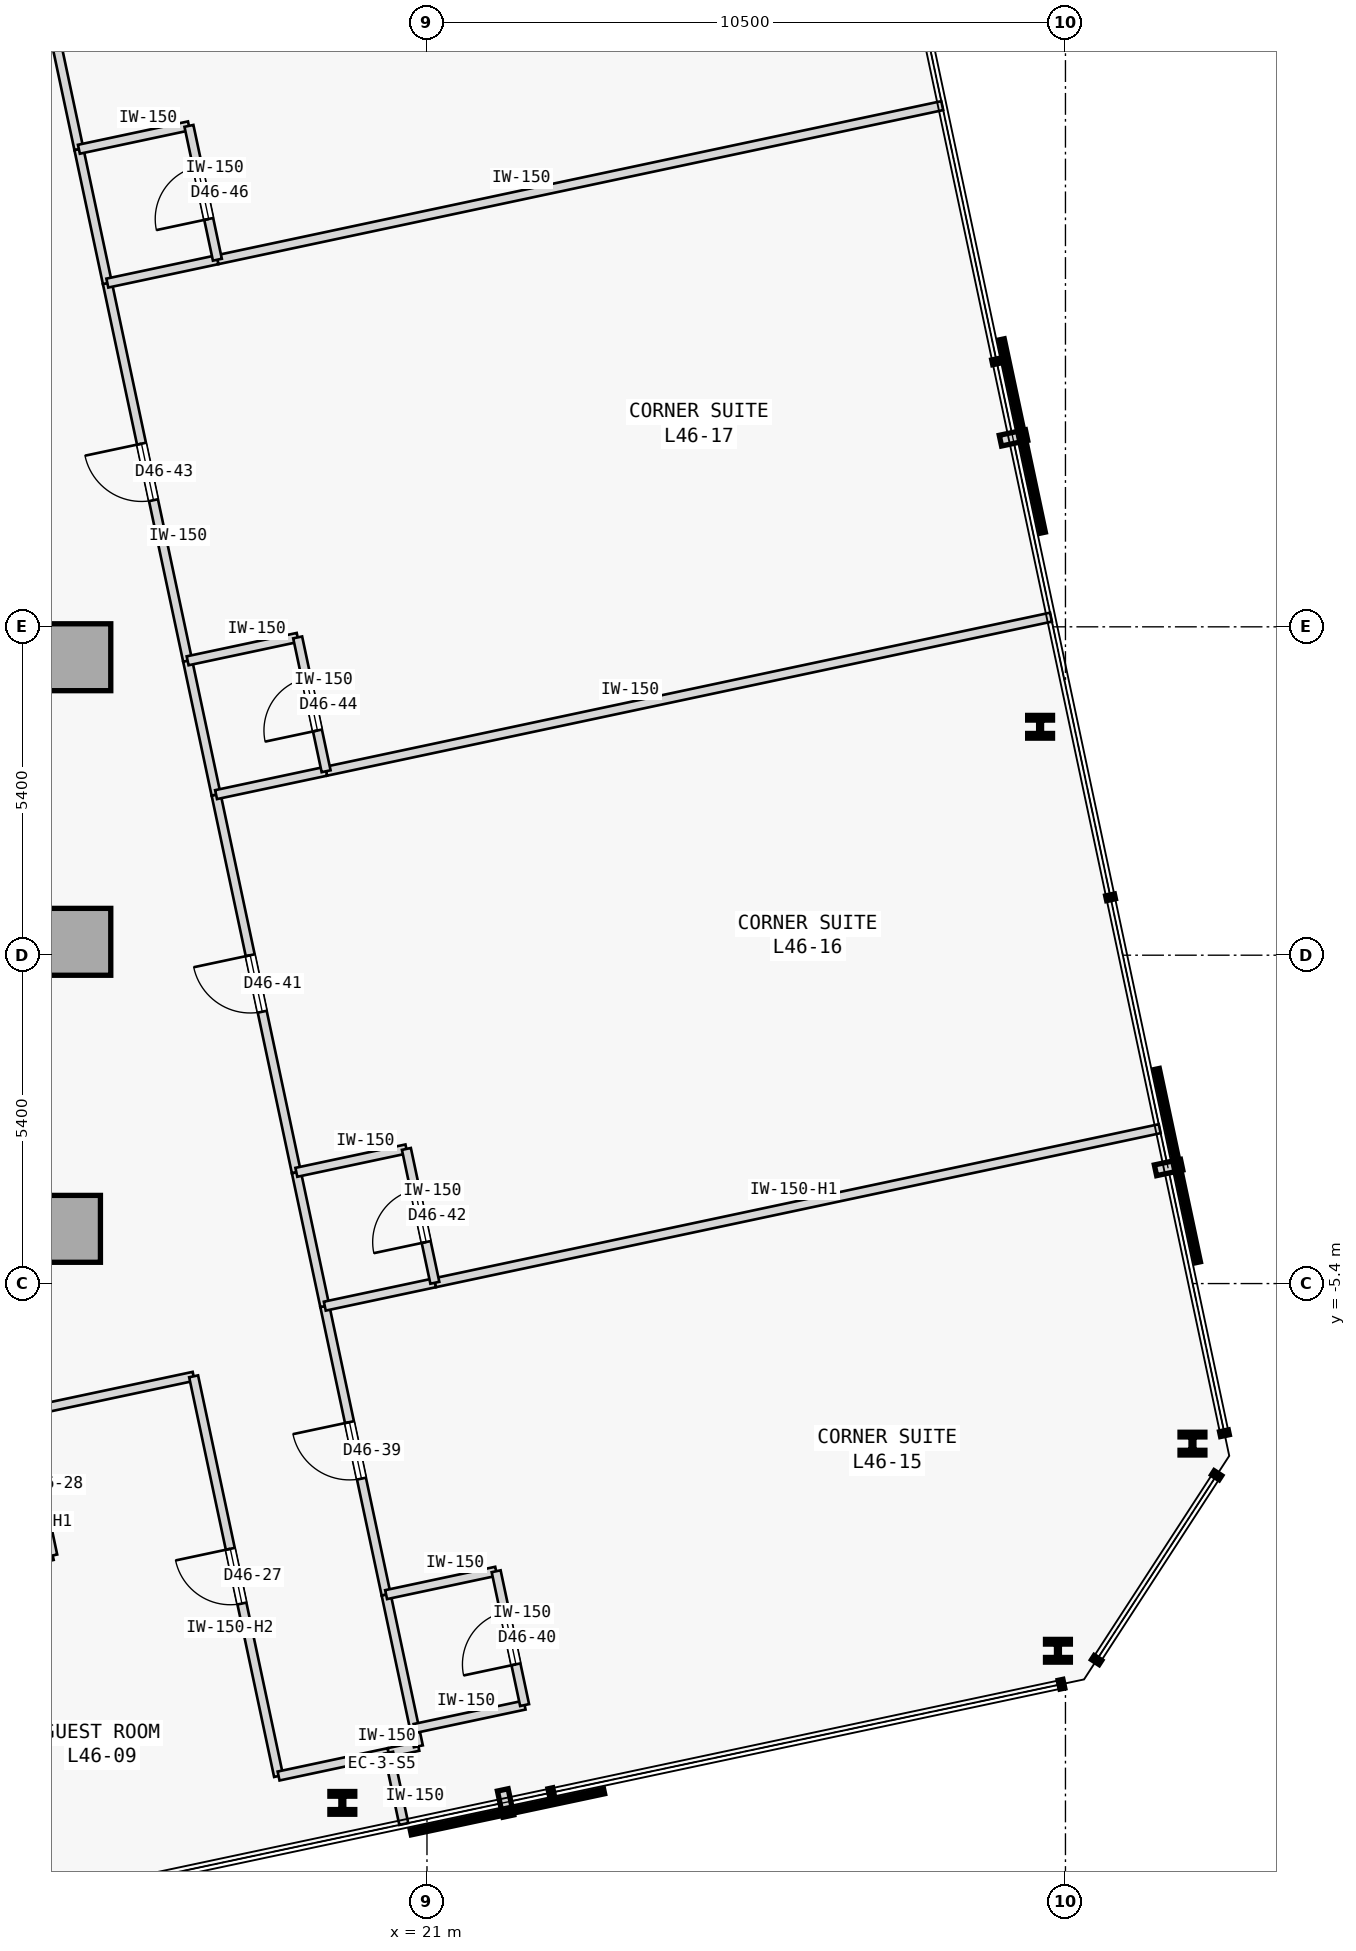
"""IFC4 building model, lengths in metres.
Left out: names, types, materials, properties, quantities, classifications, styles, units other than length and angle.
Written with IfcOpenShell. Run it as: python <this file> out.ifc"""

import sys

from ifc_helpers import new_model, si_unit, direction, frame, frame_2d, origin, origin_2d, place, context, subcontext, project, spatial, rectangle, i_section, extrude, element, fill, save


model = new_model("IFC4")
c1 = context("Model", 3, precision=1e-05, world=origin(), true_north=direction((0.0, 1.0)))
c2 = subcontext(c1, "Body", "Model", "MODEL_VIEW")
j1 = project(units=[si_unit("LENGTHUNIT", "METRE"), si_unit("PLANEANGLEUNIT", "RADIAN")], contexts=[c1])
p1 = place(None, origin())
s1 = spatial("IfcSite", under=j1, at=p1, CompositionType="ELEMENT")
p2 = place(p1, origin())
s2 = spatial("IfcBuilding", under=s1, at=p2, CompositionType="ELEMENT")
p3 = place(p2, frame((0.0, 0.0, 178.6)))
s3 = spatial("IfcBuildingStorey", under=s2, at=p3, CompositionType="ELEMENT", Elevation=178.6)
for number, where, z_axis, x_axis in (
    (1, (15.25, 4.9, 0.0), (0.0, 0.0, 1.0), (1.0, 0.0, 0.0)),
    (2, (15.25, 0.22, 0.0), (0.0, 0.0, 1.0), (1.0, 0.0, 0.0)),
    (3, (15.08, -4.5, 0.0), (0.0, 0.0, 1.0), (1.0, 0.0, 0.0)),
):
    element("IfcColumn", number, at=place(p3, frame(where, z_axis=z_axis, x_axis=x_axis)), inside=s3, PredefinedType="COLUMN", context=c2, shape_type="SweptSolid", body=[
        extrude(rectangle(XDim=1.1, YDim=1.1, at=origin_2d()), origin(), (0.0, 0.0, 1.0), 3.4),
    ])
for number, where, z_axis, x_axis in (
    (4, (19.608, -13.94, 0.0), (0.0, 0.0, 1.0), (1.0, 0.0, 0.0)),
    (5, (31.376, -11.439, 0.0), (0.0, 0.0, 1.0), (1.0, 0.0, 0.0)),
    (6, (33.589, -8.032, 0.0), (0.0, 0.0, 1.0), (1.0, 0.0, 0.0)),
    (7, (31.083, 3.756, 0.0), (0.0, 0.0, 1.0), (1.0, 0.0, 0.0)),
):
    element("IfcColumn", number, at=place(p3, frame(where, z_axis=z_axis, x_axis=x_axis)), inside=s3, PredefinedType="COLUMN", context=c2, shape_type="SweptSolid", body=[
        extrude(i_section(OverallWidth=0.409, OverallDepth=0.374, WebThickness=0.048, FlangeThickness=0.077, FilletRadius=0.015, at=origin_2d()), origin(), (0.0, 0.0, 1.0), 3.4),
    ])
p4 = place(p3, frame((14.346, -7.524, 0.0), z_axis=(0.0, 0.0, 1.0), x_axis=(0.97816208355, 0.207843542851, 0.0)))
e8 = element("IfcWall", 8, at=p4, inside=s3, PredefinedType="PARTITIONING", context=c2, shape_type="SweptSolid", body=[
    extrude(rectangle(XDim=2.879, YDim=0.15, at=frame_2d((1.439, 0.0))), origin(), (0.0, 0.0, 1.0), 3.175),
])
p5 = place(p3, frame((18.56, -13.498, 0.0), z_axis=(0.0, 0.0, 1.0), x_axis=(-0.207888737749, 0.978152479278, 0.0)))
e9 = element("IfcWall", 9, at=p5, inside=s3, PredefinedType="PARTITIONING", context=c2, shape_type="SweptSolid", body=[
    extrude(rectangle(XDim=6.72, YDim=0.15, at=frame_2d((3.36, 0.0))), origin(), (0.0, 0.0, 1.0), 2.575),
])
p6 = place(p5, frame((2.9, 0.0, 0.0)))
e10 = element("IfcOpeningElement", 10, at=p6, cuts=e9, PredefinedType="OPENING", context=c2, shape_type="SweptSolid", body=[
    extrude(rectangle(XDim=0.92, YDim=2.15, at=frame_2d((0.46, 1.075))), frame((0.0, 0.085, 0.0), z_axis=(0.0, -1.0, 0.0), x_axis=(1.0, 0.0, 0.0)), (0.0, 0.0, 1.0), 0.17),
])
p7 = place(p3, frame((18.56, -13.498, 0.0), z_axis=(0.0, 0.0, 1.0), x_axis=(0.978160192495, 0.207852442415, 0.0)))
e11 = element("IfcWall", 11, at=p7, inside=s3, PredefinedType="PARTITIONING", context=c2, shape_type="SweptSolid", body=[
    extrude(rectangle(XDim=1.85, YDim=0.15, at=frame_2d((0.925, 0.0))), origin(), (0.0, 0.0, 1.0), 3.175),
])
p8 = place(p3, frame((20.369, -13.114, 0.0), z_axis=(0.0, 0.0, 1.0), x_axis=(0.978143962546, 0.207928806409, 0.0)))
e12 = element("IfcWall", 12, at=p8, inside=s3, PredefinedType="PARTITIONING", context=c2, shape_type="SweptSolid", body=[
    extrude(rectangle(XDim=0.5, YDim=0.15, at=frame_2d((0.25, 0.0))), origin(), (0.0, 0.0, 1.0), 3.175),
])
p9 = place(p3, frame((20.858, -13.01, 0.0), z_axis=(0.0, 0.0, 1.0), x_axis=(-0.208306395052, 0.978063620518, 0.0)))
e13 = element("IfcWall", 13, at=p9, inside=s3, PredefinedType="PARTITIONING", context=c2, shape_type="SweptSolid", body=[
    extrude(rectangle(XDim=0.3, YDim=0.15, at=frame_2d((0.15, 0.0))), origin(), (0.0, 0.0, 1.0), 3.175),
])
p10 = place(p3, frame((20.328, -10.515, 0.0), z_axis=(0.0, 0.0, 1.0), x_axis=(-0.207950868925, 0.97813927235, 0.0)))
e14 = element("IfcWall", 14, at=p10, inside=s3, PredefinedType="PARTITIONING", context=c2, shape_type="SweptSolid", body=[
    extrude(rectangle(XDim=4.85, YDim=0.15, at=frame_2d((2.425, 0.0))), origin(), (0.0, 0.0, 1.0), 3.175),
])
p11 = place(p10, frame((1.95, 0.0, 0.0)))
e15 = element("IfcOpeningElement", 15, at=p11, cuts=e14, PredefinedType="OPENING", context=c2, shape_type="SweptSolid", body=[
    extrude(rectangle(XDim=0.95, YDim=2.15, at=frame_2d((0.475, 1.075))), frame((0.0, 0.085, 0.0), z_axis=(0.0, -1.0, 0.0), x_axis=(1.0, 0.0, 0.0)), (0.0, 0.0, 1.0), 0.17),
])
p12 = place(p3, frame((20.796, -12.716, 0.0), z_axis=(0.0, 0.0, 1.0), x_axis=(-0.207891197838, 0.978151956427, 0.0)))
e16 = element("IfcWall", 16, at=p12, inside=s3, PredefinedType="PARTITIONING", context=c2, shape_type="SweptSolid", body=[
    extrude(rectangle(XDim=2.25, YDim=0.15, at=frame_2d((1.125, 0.0))), origin(), (0.0, 0.0, 1.0), 3.175),
])
p13 = place(p3, frame((18.852, -3.571, 0.0), z_axis=(0.0, 0.0, 1.0), x_axis=(-0.207879907349, 0.978154355979, 0.0)))
e17 = element("IfcWall", 17, at=p13, inside=s3, PredefinedType="PARTITIONING", context=c2, shape_type="SweptSolid", body=[
    extrude(rectangle(XDim=6.35, YDim=0.15, at=frame_2d((3.175, 0.0))), origin(), (0.0, 0.0, 1.0), 3.175),
])
p14 = place(p13, frame((2.7, 0.0, 0.0)))
e18 = element("IfcOpeningElement", 18, at=p14, cuts=e17, PredefinedType="OPENING", context=c2, shape_type="SweptSolid", body=[
    extrude(rectangle(XDim=0.95, YDim=2.15, at=frame_2d((0.475, 1.075))), frame((0.0, 0.085, 0.0), z_axis=(0.0, -1.0, 0.0), x_axis=(1.0, 0.0, 0.0)), (0.0, 0.0, 1.0), 0.17),
])
p15 = place(p3, frame((19.32, -5.771, 0.0), z_axis=(0.0, 0.0, 1.0), x_axis=(-0.207913264065, 0.978147266328, 0.0)))
e19 = element("IfcWall", 19, at=p15, inside=s3, PredefinedType="PARTITIONING", context=c2, shape_type="SweptSolid", body=[
    extrude(rectangle(XDim=2.25, YDim=0.15, at=frame_2d((1.125, 0.0))), origin(), (0.0, 0.0, 1.0), 3.175),
])
p16 = place(p3, frame((17.064, 4.841, 0.0), z_axis=(0.0, 0.0, 1.0), x_axis=(-0.207924511115, 0.978144875608, 0.0)))
e20 = element("IfcWall", 20, at=p16, inside=s3, PredefinedType="PARTITIONING", context=c2, shape_type="SweptSolid", body=[
    extrude(rectangle(XDim=6.35, YDim=0.15, at=frame_2d((3.175, 0.0))), origin(), (0.0, 0.0, 1.0), 3.175),
])
p17 = place(p16, frame((2.7, 0.0, 0.0)))
e21 = element("IfcOpeningElement", 21, at=p17, cuts=e20, PredefinedType="OPENING", context=c2, shape_type="SweptSolid", body=[
    extrude(rectangle(XDim=0.95, YDim=2.15, at=frame_2d((0.475, 1.075))), frame((0.0, 0.085, 0.0), z_axis=(0.0, -1.0, 0.0), x_axis=(1.0, 0.0, 0.0)), (0.0, 0.0, 1.0), 0.17),
])
p18 = place(p3, frame((17.532, 2.641, 0.0), z_axis=(0.0, 0.0, 1.0), x_axis=(-0.207913264065, 0.978147266328, 0.0)))
e22 = element("IfcWall", 22, at=p18, inside=s3, PredefinedType="PARTITIONING", context=c2, shape_type="SweptSolid", body=[
    extrude(rectangle(XDim=2.25, YDim=0.15, at=frame_2d((1.125, 0.0))), origin(), (0.0, 0.0, 1.0), 3.175),
])
p19 = place(p3, frame((15.276, 13.253, 0.0), z_axis=(0.0, 0.0, 1.0), x_axis=(-0.207924511115, 0.978144875608, 0.0)))
e23 = element("IfcWall", 23, at=p19, inside=s3, PredefinedType="PARTITIONING", context=c2, shape_type="SweptSolid", body=[
    extrude(rectangle(XDim=6.35, YDim=0.15, at=frame_2d((3.175, 0.0))), origin(), (0.0, 0.0, 1.0), 3.175),
])
p20 = place(p19, frame((2.7, 0.0, 0.0)))
e24 = element("IfcOpeningElement", 24, at=p20, cuts=e23, PredefinedType="OPENING", context=c2, shape_type="SweptSolid", body=[
    extrude(rectangle(XDim=0.95, YDim=2.15, at=frame_2d((0.475, 1.075))), frame((0.0, 0.085, 0.0), z_axis=(0.0, -1.0, 0.0), x_axis=(1.0, 0.0, 0.0)), (0.0, 0.0, 1.0), 0.17),
])
p21 = place(p3, frame((15.744, 11.052, 0.0), z_axis=(0.0, 0.0, 1.0), x_axis=(-0.207891197838, 0.978151956427, 0.0)))
e25 = element("IfcWall", 25, at=p21, inside=s3, PredefinedType="PARTITIONING", context=c2, shape_type="SweptSolid", body=[
    extrude(rectangle(XDim=2.25, YDim=0.15, at=frame_2d((1.125, 0.0))), origin(), (0.0, 0.0, 1.0), 3.175),
])
p22 = place(p3, frame((12.742, -10.318, 0.0), z_axis=(0.0, 0.0, 1.0), x_axis=(0.978146728319, 0.207915795165, 0.0)))
e26 = element("IfcWall", 26, at=p22, inside=s3, PredefinedType="PARTITIONING", context=c2, shape_type="SweptSolid", body=[
    extrude(rectangle(XDim=2.15, YDim=0.15, at=frame_2d((1.075, 0.0))), origin(), (0.0, 0.0, 1.0), 3.175),
])
p23 = place(p3, frame((14.845, -9.871, 0.0), z_axis=(0.0, 0.0, 1.0), x_axis=(-0.207917150959, 0.978146440129, 0.0)))
e27 = element("IfcWall", 27, at=p23, inside=s3, PredefinedType="PARTITIONING", context=c2, shape_type="SweptSolid", body=[
    extrude(rectangle(XDim=2.4, YDim=0.15, at=frame_2d((1.2, 0.0))), origin(), (0.0, 0.0, 1.0), 2.725),
])
p24 = place(p23, frame((0.76, 0.0, 0.0)))
e28 = element("IfcOpeningElement", 28, at=p24, cuts=e27, PredefinedType="OPENING", context=c2, shape_type="SweptSolid", body=[
    extrude(rectangle(XDim=0.88, YDim=2.15, at=frame_2d((0.44, 1.075))), frame((0.0, 0.085, 0.0), z_axis=(0.0, -1.0, 0.0), x_axis=(1.0, 0.0, 0.0)), (0.0, 0.0, 1.0), 0.17),
])
p25 = place(p3, frame((20.619, -14.288, 0.0), z_axis=(0.0, 0.0, 1.0), x_axis=(-0.207917150959, 0.978146440129, 0.0)))
e29 = element("IfcWall", 29, at=p25, inside=s3, PredefinedType="PARTITIONING", context=c2, shape_type="SweptSolid", body=[
    extrude(rectangle(XDim=1.2, YDim=0.15, at=frame_2d((0.6, 0.0))), origin(), (0.0, 0.0, 1.0), 3.175),
])
for number, where, z_axis, x_axis in (
    (30, (20.796, -12.716, 0.0), (0.0, 0.0, 1.0), (0.978, 0.208, 0.0)),
    (31, (20.328, -10.515, 0.0), (0.0, 0.0, 1.0), (0.978, 0.208, 0.0)),
):
    element("IfcWall", number, at=place(p3, frame(where, z_axis=z_axis, x_axis=x_axis)), inside=s3, PredefinedType="PARTITIONING", context=c2, shape_type="SweptSolid", body=[
        extrude(rectangle(XDim=1.85, YDim=0.15, at=frame_2d((0.925, 0.0))), origin(), (0.0, 0.0, 1.0), 3.175),
    ])
p26 = place(p3, frame((22.605, -12.332, 0.0), z_axis=(0.0, 0.0, 1.0), x_axis=(-0.207891197838, 0.978151956427, 0.0)))
e32 = element("IfcWall", 32, at=p26, inside=s3, PredefinedType="PARTITIONING", context=c2, shape_type="SweptSolid", body=[
    extrude(rectangle(XDim=2.25, YDim=0.15, at=frame_2d((1.125, 0.0))), origin(), (0.0, 0.0, 1.0), 3.175),
])
p27 = place(p26, frame((0.685, 0.0, 0.0)))
e33 = element("IfcOpeningElement", 33, at=p27, cuts=e32, PredefinedType="OPENING", context=c2, shape_type="SweptSolid", body=[
    extrude(rectangle(XDim=0.88, YDim=2.15, at=frame_2d((0.44, 1.075))), frame((0.0, 0.085, 0.0), z_axis=(0.0, -1.0, 0.0), x_axis=(1.0, 0.0, 0.0)), (0.0, 0.0, 1.0), 0.17),
])
p28 = place(p3, frame((21.129, -5.387, 0.0), z_axis=(0.0, 0.0, 1.0), x_axis=(0.97814556055, 0.207921288896, 0.0)))
e34 = element("IfcWall", 34, at=p28, inside=s3, PredefinedType="PARTITIONING", context=c2, shape_type="SweptSolid", body=[
    extrude(rectangle(XDim=12.187, YDim=0.15, at=frame_2d((6.094, 0.0))), origin(), (0.0, 0.0, 1.0), 2.725),
])
p29 = place(p3, frame((19.32, -5.771, 0.0), z_axis=(0.0, 0.0, 1.0), x_axis=(0.978165892835, 0.207825614625, 0.0)))
e35 = element("IfcWall", 35, at=p29, inside=s3, PredefinedType="PARTITIONING", context=c2, shape_type="SweptSolid", body=[
    extrude(rectangle(XDim=1.85, YDim=0.15, at=frame_2d((0.925, 0.0))), origin(), (0.0, 0.0, 1.0), 3.175),
])
p30 = place(p3, frame((18.852, -3.571, 0.0), z_axis=(0.0, 0.0, 1.0), x_axis=(0.978139061018, 0.207951862966, 0.0)))
e36 = element("IfcWall", 36, at=p30, inside=s3, PredefinedType="PARTITIONING", context=c2, shape_type="SweptSolid", body=[
    extrude(rectangle(XDim=1.85, YDim=0.15, at=frame_2d((0.925, 0.0))), origin(), (0.0, 0.0, 1.0), 3.175),
])
p31 = place(p3, frame((21.129, -5.387, 0.0), z_axis=(0.0, 0.0, 1.0), x_axis=(-0.207891197838, 0.978151956427, 0.0)))
e37 = element("IfcWall", 37, at=p31, inside=s3, PredefinedType="PARTITIONING", context=c2, shape_type="SweptSolid", body=[
    extrude(rectangle(XDim=2.25, YDim=0.15, at=frame_2d((1.125, 0.0))), origin(), (0.0, 0.0, 1.0), 3.175),
])
p32 = place(p31, frame((0.685, 0.0, 0.0)))
e38 = element("IfcOpeningElement", 38, at=p32, cuts=e37, PredefinedType="OPENING", context=c2, shape_type="SweptSolid", body=[
    extrude(rectangle(XDim=0.88, YDim=2.15, at=frame_2d((0.44, 1.075))), frame((0.0, 0.085, 0.0), z_axis=(0.0, -1.0, 0.0), x_axis=(1.0, 0.0, 0.0)), (0.0, 0.0, 1.0), 0.17),
])
p33 = place(p3, frame((19.341, 3.025, 0.0), z_axis=(0.0, 0.0, 1.0), x_axis=(0.97814556055, 0.207921288896, 0.0)))
e39 = element("IfcWall", 39, at=p33, inside=s3, PredefinedType="PARTITIONING", context=c2, shape_type="SweptSolid", body=[
    extrude(rectangle(XDim=12.187, YDim=0.15, at=frame_2d((6.094, 0.0))), origin(), (0.0, 0.0, 1.0), 3.175),
])
p34 = place(p3, frame((17.532, 2.641, 0.0), z_axis=(0.0, 0.0, 1.0), x_axis=(0.978160192495, 0.207852442415, 0.0)))
e40 = element("IfcWall", 40, at=p34, inside=s3, PredefinedType="PARTITIONING", context=c2, shape_type="SweptSolid", body=[
    extrude(rectangle(XDim=1.85, YDim=0.15, at=frame_2d((0.925, 0.0))), origin(), (0.0, 0.0, 1.0), 3.175),
])
p35 = place(p3, frame((17.064, 4.841, 0.0), z_axis=(0.0, 0.0, 1.0), x_axis=(0.978133353907, 0.20797870558, 0.0)))
e41 = element("IfcWall", 41, at=p35, inside=s3, PredefinedType="PARTITIONING", context=c2, shape_type="SweptSolid", body=[
    extrude(rectangle(XDim=1.85, YDim=0.15, at=frame_2d((0.925, 0.0))), origin(), (0.0, 0.0, 1.0), 3.175),
])
p36 = place(p3, frame((19.341, 3.025, 0.0), z_axis=(0.0, 0.0, 1.0), x_axis=(-0.207891197838, 0.978151956427, 0.0)))
e42 = element("IfcWall", 42, at=p36, inside=s3, PredefinedType="PARTITIONING", context=c2, shape_type="SweptSolid", body=[
    extrude(rectangle(XDim=2.25, YDim=0.15, at=frame_2d((1.125, 0.0))), origin(), (0.0, 0.0, 1.0), 3.175),
])
p37 = place(p36, frame((0.685, 0.0, 0.0)))
e43 = element("IfcOpeningElement", 43, at=p37, cuts=e42, PredefinedType="OPENING", context=c2, shape_type="SweptSolid", body=[
    extrude(rectangle(XDim=0.88, YDim=2.15, at=frame_2d((0.44, 1.075))), frame((0.0, 0.085, 0.0), z_axis=(0.0, -1.0, 0.0), x_axis=(1.0, 0.0, 0.0)), (0.0, 0.0, 1.0), 0.17),
])
p38 = place(p3, frame((17.553, 11.437, 0.0), z_axis=(0.0, 0.0, 1.0), x_axis=(0.97814556055, 0.207921288896, 0.0)))
e44 = element("IfcWall", 44, at=p38, inside=s3, PredefinedType="PARTITIONING", context=c2, shape_type="SweptSolid", body=[
    extrude(rectangle(XDim=12.187, YDim=0.15, at=frame_2d((6.094, 0.0))), origin(), (0.0, 0.0, 1.0), 3.175),
])
for number, where, z_axis, x_axis in (
    (45, (15.744, 11.052, 0.0), (0.0, 0.0, 1.0), (0.978, 0.208, 0.0)),
    (46, (15.276, 13.253, 0.0), (0.0, 0.0, 1.0), (0.978, 0.208, 0.0)),
):
    element("IfcWall", number, at=place(p3, frame(where, z_axis=z_axis, x_axis=x_axis)), inside=s3, PredefinedType="PARTITIONING", context=c2, shape_type="SweptSolid", body=[
        extrude(rectangle(XDim=1.85, YDim=0.15, at=frame_2d((0.925, 0.0))), origin(), (0.0, 0.0, 1.0), 3.175),
    ])
p39 = place(p3, frame((17.553, 11.437, 0.0), z_axis=(0.0, 0.0, 1.0), x_axis=(-0.207891197838, 0.978151956427, 0.0)))
e47 = element("IfcWall", 47, at=p39, inside=s3, PredefinedType="PARTITIONING", context=c2, shape_type="SweptSolid", body=[
    extrude(rectangle(XDim=2.25, YDim=0.15, at=frame_2d((1.125, 0.0))), origin(), (0.0, 0.0, 1.0), 3.175),
])
p40 = place(p39, frame((0.685, 0.0, 0.0)))
e48 = element("IfcOpeningElement", 48, at=p40, cuts=e47, PredefinedType="OPENING", context=c2, shape_type="SweptSolid", body=[
    extrude(rectangle(XDim=0.88, YDim=2.15, at=frame_2d((0.44, 1.075))), frame((0.0, 0.085, 0.0), z_axis=(0.0, -1.0, 0.0), x_axis=(1.0, 0.0, 0.0)), (0.0, 0.0, 1.0), 0.17),
])
p41 = place(p6, origin())
e49 = element("IfcDoor", 49, at=p41, inside=s3, OperationType="SINGLE_SWING_RIGHT", PredefinedType="DOOR", context=c2, shape_type="SweptSolid", body=[
    extrude(rectangle(XDim=0.92, YDim=2.15, at=frame_2d((0.46, 1.075))), frame((0.0, 0.025, 0.0), z_axis=(0.0, -1.0, 0.0), x_axis=(1.0, 0.0, 0.0)), (0.0, 0.0, 1.0), 0.05),
])
fill(e10, e49)
p42 = place(p11, origin())
e50 = element("IfcDoor", 50, at=p42, inside=s3, OperationType="SINGLE_SWING_RIGHT", PredefinedType="DOOR", context=c2, shape_type="SweptSolid", body=[
    extrude(rectangle(XDim=0.95, YDim=2.15, at=frame_2d((0.475, 1.075))), frame((0.0, 0.025, 0.0), z_axis=(0.0, -1.0, 0.0), x_axis=(1.0, 0.0, 0.0)), (0.0, 0.0, 1.0), 0.05),
])
fill(e15, e50)
p43 = place(p27, origin())
e51 = element("IfcDoor", 51, at=p43, inside=s3, OperationType="SINGLE_SWING_LEFT", PredefinedType="DOOR", context=c2, shape_type="SweptSolid", body=[
    extrude(rectangle(XDim=0.88, YDim=2.15, at=frame_2d((0.44, 1.075))), frame((0.0, 0.025, 0.0), z_axis=(0.0, -1.0, 0.0), x_axis=(1.0, 0.0, 0.0)), (0.0, 0.0, 1.0), 0.05),
])
fill(e33, e51)
p44 = place(p14, origin())
e52 = element("IfcDoor", 52, at=p44, inside=s3, OperationType="SINGLE_SWING_RIGHT", PredefinedType="DOOR", context=c2, shape_type="SweptSolid", body=[
    extrude(rectangle(XDim=0.95, YDim=2.15, at=frame_2d((0.475, 1.075))), frame((0.0, 0.025, 0.0), z_axis=(0.0, -1.0, 0.0), x_axis=(1.0, 0.0, 0.0)), (0.0, 0.0, 1.0), 0.05),
])
fill(e18, e52)
p45 = place(p32, origin())
e53 = element("IfcDoor", 53, at=p45, inside=s3, OperationType="SINGLE_SWING_LEFT", PredefinedType="DOOR", context=c2, shape_type="SweptSolid", body=[
    extrude(rectangle(XDim=0.88, YDim=2.15, at=frame_2d((0.44, 1.075))), frame((0.0, 0.025, 0.0), z_axis=(0.0, -1.0, 0.0), x_axis=(1.0, 0.0, 0.0)), (0.0, 0.0, 1.0), 0.05),
])
fill(e38, e53)
p46 = place(p17, origin())
e54 = element("IfcDoor", 54, at=p46, inside=s3, OperationType="SINGLE_SWING_RIGHT", PredefinedType="DOOR", context=c2, shape_type="SweptSolid", body=[
    extrude(rectangle(XDim=0.95, YDim=2.15, at=frame_2d((0.475, 1.075))), frame((0.0, 0.025, 0.0), z_axis=(0.0, -1.0, 0.0), x_axis=(1.0, 0.0, 0.0)), (0.0, 0.0, 1.0), 0.05),
])
fill(e21, e54)
p47 = place(p37, origin())
e55 = element("IfcDoor", 55, at=p47, inside=s3, OperationType="SINGLE_SWING_LEFT", PredefinedType="DOOR", context=c2, shape_type="SweptSolid", body=[
    extrude(rectangle(XDim=0.88, YDim=2.15, at=frame_2d((0.44, 1.075))), frame((0.0, 0.025, 0.0), z_axis=(0.0, -1.0, 0.0), x_axis=(1.0, 0.0, 0.0)), (0.0, 0.0, 1.0), 0.05),
])
fill(e43, e55)
p48 = place(p40, origin())
e56 = element("IfcDoor", 56, at=p48, inside=s3, OperationType="SINGLE_SWING_LEFT", PredefinedType="DOOR", context=c2, shape_type="SweptSolid", body=[
    extrude(rectangle(XDim=0.88, YDim=2.15, at=frame_2d((0.44, 1.075))), frame((0.0, 0.025, 0.0), z_axis=(0.0, -1.0, 0.0), x_axis=(1.0, 0.0, 0.0)), (0.0, 0.0, 1.0), 0.05),
])
fill(e48, e56)
save(model, sys.argv[1])
